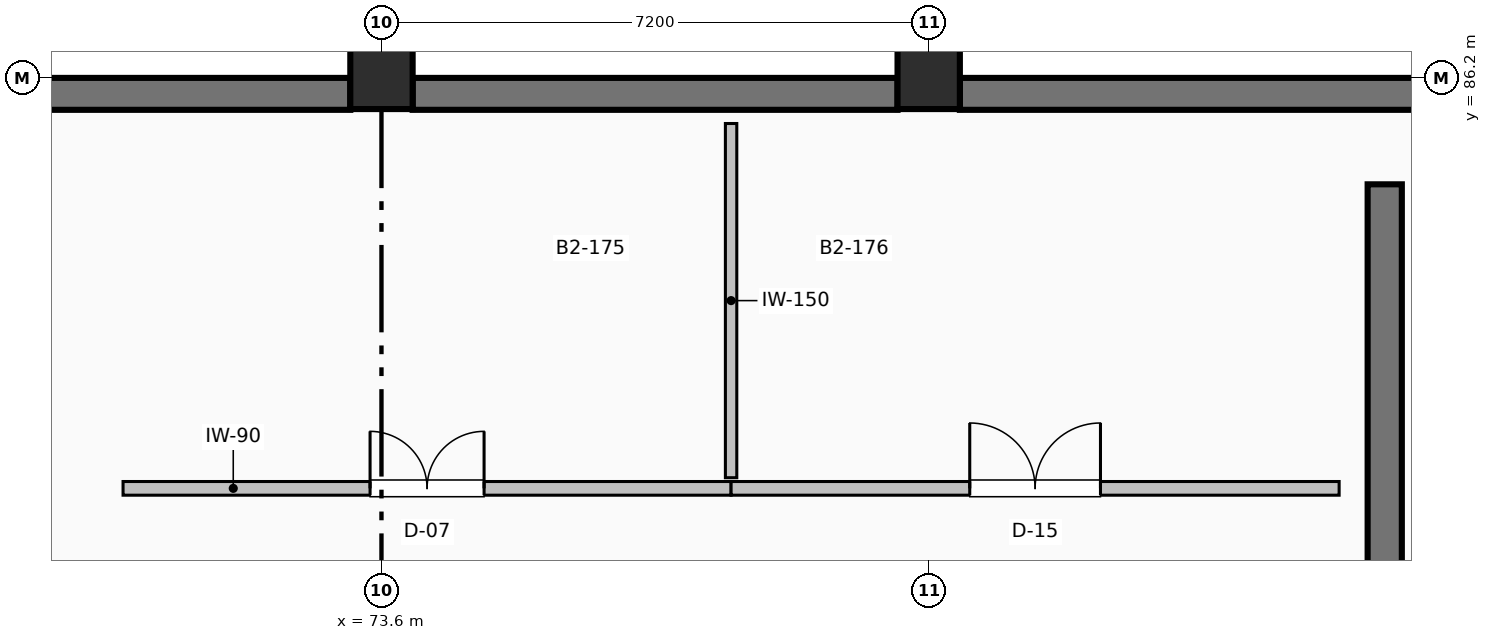
"""IFC4 building model, lengths in metres.
Left out: names, types, materials, properties, quantities, classifications, styles, units other than length and angle.
Written with IfcOpenShell. Run it as: python <this file> out.ifc"""

import sys

from ifc_helpers import new_model, si_unit, direction, frame, frame_2d, origin, origin_2d, place, context, subcontext, project, spatial, rectangle, extrude, element, fill, save


model = new_model("IFC4")
c1 = context("Model", 3, precision=1e-05, world=origin(), true_north=direction((0.0, 1.0)))
c2 = subcontext(c1, "Body", "Model", "MODEL_VIEW")
j1 = project(units=[si_unit("LENGTHUNIT", "METRE"), si_unit("PLANEANGLEUNIT", "RADIAN")], contexts=[c1])
p1 = place(None, origin())
s1 = spatial("IfcSite", under=j1, at=p1, CompositionType="ELEMENT")
p2 = place(p1, origin())
s2 = spatial("IfcBuilding", under=s1, at=p2, CompositionType="ELEMENT")
p3 = place(p2, frame((0.0, 0.0, -9.6)))
s3 = spatial("IfcBuildingStorey", under=s2, at=p3, CompositionType="ELEMENT", Elevation=-9.6)
for number, where, z_axis, x_axis in (
    (1, (73.6, 86.2, 0.0), (0.0, 0.0, 1.0), (1.0, 0.0, 0.0)),
    (2, (80.8, 86.2, 0.0), (0.0, 0.0, 1.0), (1.0, 0.0, 0.0)),
):
    element("IfcColumn", number, at=place(p3, frame(where, z_axis=z_axis, x_axis=x_axis)), inside=s3, PredefinedType="COLUMN", context=c2, shape_type="SweptSolid", body=[
        extrude(rectangle(XDim=0.82, YDim=0.82, at=origin_2d()), origin(), (0.0, 0.0, 1.0), 4.8),
    ])
p4 = place(p3, frame((86.8, 70.8, 0.0), z_axis=(0.0, 0.0, 1.0), x_axis=(0.0, 1.0, 0.0)))
e3 = element("IfcWall", 3, at=p4, inside=s3, PredefinedType="SHEAR", context=c2, shape_type="SweptSolid", body=[
    extrude(rectangle(XDim=14.0, YDim=0.45, at=frame_2d((7.0, 0.0))), origin(), (0.0, 0.0, 1.0), 4.48),
])
for number, where, z_axis, x_axis in (
    (4, (66.81, 85.99, 0.0), (0.0, 0.0, 1.0), (1.0, 0.0, 0.0)),
    (5, (74.01, 85.99, 0.0), (0.0, 0.0, 1.0), (1.0, 0.0, 0.0)),
):
    element("IfcWall", number, at=place(p3, frame(where, z_axis=z_axis, x_axis=x_axis)), inside=s3, PredefinedType="SHEAR", context=c2, shape_type="SweptSolid", body=[
        extrude(rectangle(XDim=6.38, YDim=0.42, at=frame_2d((3.19, 0.0))), origin(), (0.0, 0.0, 1.0), 4.5),
    ])
p5 = place(p3, frame((81.21, 85.99, 0.0), z_axis=(0.0, 0.0, 1.0), x_axis=(1.0, 0.0, 0.0)))
e6 = element("IfcWall", 6, at=p5, inside=s3, PredefinedType="SHEAR", context=c2, shape_type="SweptSolid", body=[
    extrude(rectangle(XDim=6.38, YDim=0.42, at=frame_2d((3.19, 0.0))), origin(), (0.0, 0.0, 1.0), 4.5),
])
p6 = place(p3, frame((70.2, 80.8, 0.0), z_axis=(0.0, 0.0, 1.0), x_axis=(1.0, 0.0, 0.0)))
e7 = element("IfcWall", 7, at=p6, inside=s3, PredefinedType="PARTITIONING", context=c2, shape_type="SweptSolid", body=[
    extrude(rectangle(XDim=8.0, YDim=0.18, at=frame_2d((4.0, 0.0))), origin(), (0.0, 0.0, 1.0), 4.492),
])
p7 = place(p6, frame((3.25, 0.0, 0.0)))
e8 = element("IfcOpeningElement", 8, at=p7, cuts=e7, PredefinedType="OPENING", context=c2, shape_type="SweptSolid", body=[
    extrude(rectangle(XDim=1.5, YDim=2.15, at=frame_2d((0.75, 1.075))), frame((0.0, 0.1, 0.0), z_axis=(0.0, -1.0, 0.0), x_axis=(1.0, 0.0, 0.0)), (0.0, 0.0, 1.0), 0.2),
])
p8 = place(p3, frame((78.2, 80.94, 0.0), z_axis=(0.0, 0.0, 1.0), x_axis=(0.0, 1.0, 0.0)))
e9 = element("IfcWall", 9, at=p8, inside=s3, PredefinedType="PARTITIONING", context=c2, shape_type="SweptSolid", body=[
    extrude(rectangle(XDim=4.66, YDim=0.15, at=frame_2d((2.33, 0.0))), origin(), (0.0, 0.0, 1.0), 4.492),
])
p9 = place(p3, frame((78.2, 80.8, 0.0), z_axis=(0.0, 0.0, 1.0), x_axis=(1.0, 0.0, 0.0)))
e10 = element("IfcWall", 10, at=p9, inside=s3, PredefinedType="PARTITIONING", context=c2, shape_type="SweptSolid", body=[
    extrude(rectangle(XDim=8.0, YDim=0.18, at=frame_2d((4.0, 0.0))), origin(), (0.0, 0.0, 1.0), 4.492),
])
p10 = place(p9, frame((3.14, 0.0, 0.0)))
e11 = element("IfcOpeningElement", 11, at=p10, cuts=e10, PredefinedType="OPENING", context=c2, shape_type="SweptSolid", body=[
    extrude(rectangle(XDim=1.72, YDim=2.22, at=frame_2d((0.86, 1.11))), frame((0.0, 0.1, 0.0), z_axis=(0.0, -1.0, 0.0), x_axis=(1.0, 0.0, 0.0)), (0.0, 0.0, 1.0), 0.2),
])
p11 = place(p7, origin())
e12 = element("IfcDoor", 12, at=p11, inside=s3, OperationType="DOUBLE_DOOR_SINGLE_SWING", PredefinedType="DOOR", context=c2, shape_type="SweptSolid", body=[
    extrude(rectangle(XDim=1.5, YDim=2.15, at=frame_2d((0.75, 1.075))), frame((0.0, 0.025, 0.0), z_axis=(0.0, -1.0, 0.0), x_axis=(1.0, 0.0, 0.0)), (0.0, 0.0, 1.0), 0.05),
])
fill(e8, e12)
p12 = place(p10, origin())
e13 = element("IfcDoor", 13, at=p12, inside=s3, OperationType="DOUBLE_DOOR_SINGLE_SWING", PredefinedType="DOOR", context=c2, shape_type="SweptSolid", body=[
    extrude(rectangle(XDim=1.72, YDim=2.22, at=frame_2d((0.86, 1.11))), frame((0.0, 0.025, 0.0), z_axis=(0.0, -1.0, 0.0), x_axis=(1.0, 0.0, 0.0)), (0.0, 0.0, 1.0), 0.05),
])
fill(e11, e13)
save(model, sys.argv[1])
